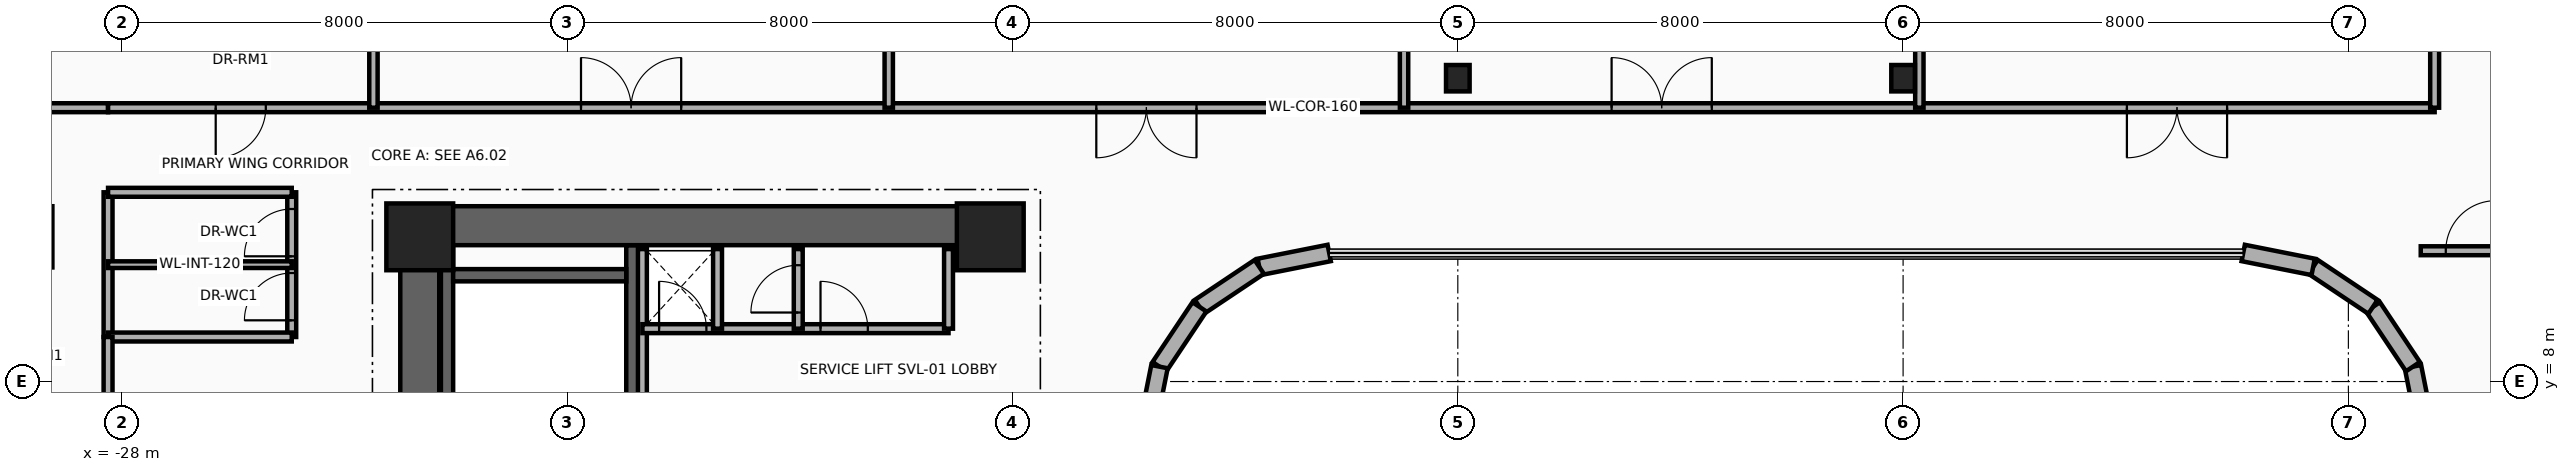
"""IFC4 building model, lengths in metres.
Left out: names, types, materials, properties, quantities, classifications, styles, units other than length and angle.
Written with IfcOpenShell. Run it as: python <this file> out.ifc"""

import sys

from ifc_helpers import new_model, si_unit, direction, frame, frame_2d, origin, origin_2d, place, context, subcontext, project, spatial, rectangle, i_section, extrude, source, transform, mapped, element, fill, save


model = new_model("IFC4")
c1 = context("Model", 3, precision=1e-05, world=origin(), true_north=direction((0.0, 1.0)))
c2 = subcontext(c1, "Body", "Model", "MODEL_VIEW")
j1 = project(units=[si_unit("LENGTHUNIT", "METRE"), si_unit("PLANEANGLEUNIT", "RADIAN")], contexts=[c1])
p1 = place(None, origin())
s1 = spatial("IfcSite", under=j1, at=p1, CompositionType="ELEMENT")
p2 = place(p1, origin())
s2 = spatial("IfcBuilding", under=s1, at=p2, CompositionType="ELEMENT")
p3 = place(p2, frame((0.0, 0.0, 135.3)))
s3 = spatial("IfcBuildingStorey", under=s2, at=p3, CompositionType="ELEMENT", Elevation=135.3)
for number, where, z_axis, x_axis in (
    (1, (-22.16, 1.78, 0.0), (0.0, 0.0, 1.0), (0.0, 1.0, 0.0)),
    (2, (-18.83, 1.78, 0.0), (0.0, 0.0, 1.0), (0.0, 1.0, 0.0)),
):
    element("IfcWall", number, at=place(p3, frame(where, z_axis=z_axis, x_axis=x_axis)), inside=s3, PredefinedType="SHEAR", context=c2, shape_type="SweptSolid", body=[
        extrude(rectangle(XDim=8.67, YDim=0.22, at=frame_2d((4.335, 0.0))), origin(), (0.0, 0.0, 1.0), 3.46),
    ])
p4 = place(p3, frame((-22.05, 9.91, 0.0), z_axis=(0.0, 0.0, 1.0), x_axis=(1.0, 0.0, 0.0)))
e3 = element("IfcWall", 3, at=p4, inside=s3, PredefinedType="SHEAR", context=c2, shape_type="SweptSolid", body=[
    extrude(rectangle(XDim=3.11, YDim=0.22, at=frame_2d((1.555, 0.0))), origin(), (0.0, 0.0, 1.0), 3.46),
])
p5 = place(p3, frame((-22.65, -11.15, 0.0), z_axis=(0.0, 0.0, 1.0), x_axis=(0.0, 1.0, 0.0)))
e4 = element("IfcWall", 4, at=p5, inside=s3, PredefinedType="SHEAR", context=c2, shape_type="SweptSolid", body=[
    extrude(rectangle(XDim=22.3, YDim=0.7, at=frame_2d((11.15, 0.0))), origin(), (0.0, 0.0, 1.0), 3.46),
])
p6 = place(p3, frame((-22.65, 10.8, 0.0), z_axis=(0.0, 0.0, 1.0), x_axis=(1.0, 0.0, 0.0)))
e5 = element("IfcWall", 5, at=p6, inside=s3, PredefinedType="SHEAR", context=c2, shape_type="SweptSolid", body=[
    extrude(rectangle(XDim=10.25, YDim=0.7, at=frame_2d((5.125, 0.0))), origin(), (0.0, 0.0, 1.0), 3.46),
])
m1 = source(origin(), c2, "Body", "SweptSolid", [
    extrude(rectangle(XDim=1.2, YDim=1.2, at=origin_2d()), origin(), (0.0, 0.0, 1.0), 3.7),
])
for number, where, z_axis, x_axis in (
    (6, (-22.65, 10.6, 0.0), (0.0, 0.0, 1.0), (1.0, 0.0, 0.0)),
    (7, (-12.4, 10.6, 0.0), (0.0, 0.0, 1.0), (1.0, 0.0, 0.0)),
):
    element("IfcColumn", number, at=place(p3, frame(where, z_axis=z_axis, x_axis=x_axis)), inside=s3, PredefinedType="COLUMN", context=c2, shape_type="MappedRepresentation", body=[
        mapped(m1, transform((0.0, 0.0, 0.0), x_axis=(1.0, 0.0, 0.0), y_axis=(0.0, 1.0, 0.0), z_axis=(0.0, 0.0, 1.0), scale=1.0)),
    ])
m2 = source(origin(), c2, "Body", "SweptSolid", [
    extrude(i_section(OverallWidth=0.424, OverallDepth=0.474, WebThickness=0.048, FlangeThickness=0.077, at=origin_2d()), origin(), (0.0, 0.0, 1.0), 3.7),
])
for number, where, z_axis, x_axis in (
    (8, (-4.0, 13.45, 0.0), (0.0, 0.0, 1.0), (1.0, 0.0, 0.0)),
    (9, (4.0, 13.45, 0.0), (0.0, 0.0, 1.0), (1.0, 0.0, 0.0)),
):
    element("IfcColumn", number, at=place(p3, frame(where, z_axis=z_axis, x_axis=x_axis)), inside=s3, PredefinedType="COLUMN", context=c2, shape_type="MappedRepresentation", body=[
        mapped(m2, transform((0.0, 0.0, 0.0), x_axis=(1.0, 0.0, 0.0), y_axis=(0.0, 1.0, 0.0), z_axis=(0.0, 0.0, 1.0), scale=1.0)),
    ])
p7 = place(p3, frame((13.41, 7.011, 0.0), z_axis=(0.0, 0.0, 1.0), x_axis=(-0.195090163074, 0.980785312019, 0.0)))
e10 = element("IfcWall", 10, at=p7, inside=s3, PredefinedType="SOLIDWALL", context=c2, shape_type="SweptSolid", body=[
    extrude(rectangle(XDim=1.281, YDim=0.3, at=frame_2d((0.641, 0.0))), origin(), (0.0, 0.0, 1.0), 3.46),
])
for number, where, z_axis, x_axis in (
    (11, (13.16, 8.268, 0.0), (0.0, 0.0, 1.0), (-0.556, 0.831, 0.0)),
    (12, (12.442, 9.342, 0.0), (0.0, 0.0, 1.0), (-0.831, 0.556, 0.0)),
):
    element("IfcWall", number, at=place(p3, frame(where, z_axis=z_axis, x_axis=x_axis)), inside=s3, PredefinedType="SOLIDWALL", context=c2, shape_type="SweptSolid", body=[
        extrude(rectangle(XDim=1.292, YDim=0.3, at=frame_2d((0.646, 0.0))), origin(), (0.0, 0.0, 1.0), 3.46),
    ])
for number, where, z_axis, x_axis in (
    (13, (11.367, 10.06, 0.0), (0.0, 0.0, 1.0), (-0.981, 0.195, 0.0)),
    (14, (-6.311, 10.31, 0.0), (0.0, 0.0, 1.0), (-0.981, -0.195, 0.0)),
):
    element("IfcWall", number, at=place(p3, frame(where, z_axis=z_axis, x_axis=x_axis)), inside=s3, PredefinedType="SOLIDWALL", context=c2, shape_type="SweptSolid", body=[
        extrude(rectangle(XDim=1.281, YDim=0.3, at=frame_2d((0.641, 0.0))), origin(), (0.0, 0.0, 1.0), 3.46),
    ])
p8 = place(p3, frame((-7.567, 10.06, 0.0), z_axis=(0.0, 0.0, 1.0), x_axis=(-0.831497739511, -0.555528135371, 0.0)))
e15 = element("IfcWall", 15, at=p8, inside=s3, PredefinedType="SOLIDWALL", context=c2, shape_type="SweptSolid", body=[
    extrude(rectangle(XDim=1.292, YDim=0.3, at=frame_2d((0.646, 0.0))), origin(), (0.0, 0.0, 1.0), 3.46),
])
p9 = place(p3, frame((-8.642, 9.342, 0.0), z_axis=(0.0, 0.0, 1.0), x_axis=(-0.555615398575, -0.831439431869, 0.0)))
e16 = element("IfcWall", 16, at=p9, inside=s3, PredefinedType="SOLIDWALL", context=c2, shape_type="SweptSolid", body=[
    extrude(rectangle(XDim=1.292, YDim=0.3, at=frame_2d((0.646, 0.0))), origin(), (0.0, 0.0, 1.0), 3.46),
])
p10 = place(p3, frame((-9.36, 8.268, 0.0), z_axis=(0.0, 0.0, 1.0), x_axis=(-0.195090163074, -0.980785312019, 0.0)))
e17 = element("IfcWall", 17, at=p10, inside=s3, PredefinedType="SOLIDWALL", context=c2, shape_type="SweptSolid", body=[
    extrude(rectangle(XDim=1.281, YDim=0.3, at=frame_2d((0.641, 0.0))), origin(), (0.0, 0.0, 1.0), 3.46),
])
p11 = place(p3, frame((-18.65, 7.45, 0.0), z_axis=(0.0, 0.0, 1.0), x_axis=(0.0, 1.0, 0.0)))
e18 = element("IfcWall", 18, at=p11, inside=s3, PredefinedType="PARTITIONING", context=c2, shape_type="SweptSolid", body=[
    extrude(rectangle(XDim=2.93, YDim=0.16, at=frame_2d((1.465, 0.0))), origin(), (0.0, 0.0, 1.0), 3.46),
])
p12 = place(p3, frame((-18.65, 8.95, 0.0), z_axis=(0.0, 0.0, 1.0), x_axis=(1.0, 0.0, 0.0)))
e19 = element("IfcWall", 19, at=p12, inside=s3, PredefinedType="PARTITIONING", context=c2, shape_type="SweptSolid", body=[
    extrude(rectangle(XDim=5.5, YDim=0.16, at=frame_2d((2.75, 0.0))), origin(), (0.0, 0.0, 1.0), 3.46),
])
p13 = place(p12, frame((0.3, 0.0, 0.0)))
e20 = element("IfcOpeningElement", 20, at=p13, cuts=e19, PredefinedType="OPENING", context=c2, shape_type="SweptSolid", body=[
    extrude(rectangle(XDim=0.85, YDim=2.05, at=frame_2d((0.425, 1.025))), frame((0.0, 0.095, 0.0), z_axis=(0.0, -1.0, 0.0), x_axis=(1.0, 0.0, 0.0)), (0.0, 0.0, 1.0), 0.19),
])
p14 = place(p12, frame((3.2, 0.0, 0.0)))
e21 = element("IfcOpeningElement", 21, at=p14, cuts=e19, PredefinedType="OPENING", context=c2, shape_type="SweptSolid", body=[
    extrude(rectangle(XDim=0.85, YDim=2.05, at=frame_2d((0.425, 1.025))), frame((0.0, 0.095, 0.0), z_axis=(0.0, -1.0, 0.0), x_axis=(1.0, 0.0, 0.0)), (0.0, 0.0, 1.0), 0.19),
])
for number, where, z_axis, x_axis in (
    (22, (-13.15, 8.95, 0.0), (0.0, 0.0, 1.0), (0.0, 1.0, 0.0)),
    (23, (-17.3, 8.95, 0.0), (0.0, 0.0, 1.0), (0.0, 1.0, 0.0)),
):
    element("IfcWall", number, at=place(p3, frame(where, z_axis=z_axis, x_axis=x_axis)), inside=s3, PredefinedType="PARTITIONING", context=c2, shape_type="SweptSolid", body=[
        extrude(rectangle(XDim=1.43, YDim=0.16, at=frame_2d((0.715, 0.0))), origin(), (0.0, 0.0, 1.0), 3.46),
    ])
p15 = place(p3, frame((-15.85, 8.95, 0.0), z_axis=(0.0, 0.0, 1.0), x_axis=(0.0, 1.0, 0.0)))
e24 = element("IfcWall", 24, at=p15, inside=s3, PredefinedType="PARTITIONING", context=c2, shape_type="SweptSolid", body=[
    extrude(rectangle(XDim=1.43, YDim=0.16, at=frame_2d((0.715, 0.0))), origin(), (0.0, 0.0, 1.0), 3.46),
])
p16 = place(p15, frame((0.29, 0.0, 0.0)))
e25 = element("IfcOpeningElement", 25, at=p16, cuts=e24, PredefinedType="OPENING", context=c2, shape_type="SweptSolid", body=[
    extrude(rectangle(XDim=0.85, YDim=2.05, at=frame_2d((0.425, 1.025))), frame((0.0, 0.095, 0.0), z_axis=(0.0, -1.0, 0.0), x_axis=(1.0, 0.0, 0.0)), (0.0, 0.0, 1.0), 0.19),
])
p17 = place(p3, frame((-28.25, 8.8, 0.0), z_axis=(0.0, 0.0, 1.0), x_axis=(0.0, 1.0, 0.0)))
e26 = element("IfcWall", 26, at=p17, inside=s3, PredefinedType="PARTITIONING", context=c2, shape_type="SweptSolid", body=[
    extrude(rectangle(XDim=2.6, YDim=0.16, at=frame_2d((1.3, 0.0))), origin(), (0.0, 0.0, 1.0), 2.666),
])
p18 = place(p3, frame((-24.95, 8.8, 0.0), z_axis=(0.0, 0.0, 1.0), x_axis=(0.0, 1.0, 0.0)))
e27 = element("IfcWall", 27, at=p18, inside=s3, PredefinedType="PARTITIONING", context=c2, shape_type="SweptSolid", body=[
    extrude(rectangle(XDim=2.6, YDim=0.16, at=frame_2d((1.3, 0.0))), origin(), (0.0, 0.0, 1.0), 2.666),
])
p19 = place(p18, frame((0.3, 0.0, 0.0)))
e28 = element("IfcOpeningElement", 28, at=p19, cuts=e27, PredefinedType="OPENING", context=c2, shape_type="SweptSolid", body=[
    extrude(rectangle(XDim=0.85, YDim=2.1, at=frame_2d((0.425, 1.05))), frame((0.0, 0.095, 0.0), z_axis=(0.0, -1.0, 0.0), x_axis=(1.0, 0.0, 0.0)), (0.0, 0.0, 1.0), 0.19),
])
p20 = place(p18, frame((1.45, 0.0, 0.0)))
e29 = element("IfcOpeningElement", 29, at=p20, cuts=e27, PredefinedType="OPENING", context=c2, shape_type="SweptSolid", body=[
    extrude(rectangle(XDim=0.85, YDim=2.1, at=frame_2d((0.425, 1.05))), frame((0.0, 0.095, 0.0), z_axis=(0.0, -1.0, 0.0), x_axis=(1.0, 0.0, 0.0)), (0.0, 0.0, 1.0), 0.19),
])
for number, where, z_axis, x_axis in (
    (30, (-28.25, 8.8, 0.0), (0.0, 0.0, 1.0), (1.0, 0.0, 0.0)),
    (31, (-28.25, 11.4, 0.0), (0.0, 0.0, 1.0), (1.0, 0.0, 0.0)),
):
    element("IfcWall", number, at=place(p3, frame(where, z_axis=z_axis, x_axis=x_axis)), inside=s3, PredefinedType="PARTITIONING", context=c2, shape_type="SweptSolid", body=[
        extrude(rectangle(XDim=3.3, YDim=0.16, at=frame_2d((1.65, 0.0))), origin(), (0.0, 0.0, 1.0), 3.46),
    ])
p21 = place(p3, frame((-28.25, 10.1, 0.0), z_axis=(0.0, 0.0, 1.0), x_axis=(1.0, 0.0, 0.0)))
e32 = element("IfcWall", 32, at=p21, inside=s3, PredefinedType="PARTITIONING", context=c2, shape_type="SweptSolid", body=[
    extrude(rectangle(XDim=3.3, YDim=0.12, at=frame_2d((1.65, 0.0))), origin(), (0.0, 0.0, 1.0), 3.46),
])
p22 = place(p3, frame((-28.25, 7.6, 0.0), z_axis=(0.0, 0.0, 1.0), x_axis=(0.0, 1.0, 0.0)))
e33 = element("IfcWall", 33, at=p22, inside=s3, PredefinedType="PARTITIONING", context=c2, shape_type="SweptSolid", body=[
    extrude(rectangle(XDim=1.2, YDim=0.16, at=frame_2d((0.6, 0.0))), origin(), (0.0, 0.0, 1.0), 2.988),
])
p23 = place(p3, frame((-30.89, 12.92, 0.0), z_axis=(0.0, 0.0, 1.0), x_axis=(1.0, 0.0, 0.0)))
e34 = element("IfcWall", 34, at=p23, inside=s3, PredefinedType="PARTITIONING", context=c2, shape_type="SweptSolid", body=[
    extrude(rectangle(XDim=2.64, YDim=0.16, at=frame_2d((1.32, 0.0))), origin(), (0.0, 0.0, 1.0), 2.896),
])
p24 = place(p3, frame((-28.25, 12.92, 0.0), z_axis=(0.0, 0.0, 1.0), x_axis=(1.0, 0.0, 0.0)))
e35 = element("IfcWall", 35, at=p24, inside=s3, PredefinedType="PARTITIONING", context=c2, shape_type="SweptSolid", body=[
    extrude(rectangle(XDim=41.8, YDim=0.16, at=frame_2d((20.9, 0.0))), origin(), (0.0, 0.0, 1.0), 2.666),
])
p25 = place(p24, frame((1.934, 0.0, 0.0)))
e36 = element("IfcOpeningElement", 36, at=p25, cuts=e35, PredefinedType="OPENING", context=c2, shape_type="SweptSolid", body=[
    extrude(rectangle(XDim=0.9, YDim=2.1, at=frame_2d((0.45, 1.05))), frame((0.0, 0.095, 0.0), z_axis=(0.0, -1.0, 0.0), x_axis=(1.0, 0.0, 0.0)), (0.0, 0.0, 1.0), 0.19),
])
p26 = place(p24, frame((8.497, 0.0, 0.0)))
e37 = element("IfcOpeningElement", 37, at=p26, cuts=e35, PredefinedType="OPENING", context=c2, shape_type="SweptSolid", body=[
    extrude(rectangle(XDim=1.8, YDim=2.15, at=frame_2d((0.9, 1.075))), frame((0.0, 0.095, 0.0), z_axis=(0.0, -1.0, 0.0), x_axis=(1.0, 0.0, 0.0)), (0.0, 0.0, 1.0), 0.19),
])
p27 = place(p24, frame((17.755, 0.0, 0.0)))
e38 = element("IfcOpeningElement", 38, at=p27, cuts=e35, PredefinedType="OPENING", context=c2, shape_type="SweptSolid", body=[
    extrude(rectangle(XDim=1.8, YDim=2.15, at=frame_2d((0.9, 1.075))), frame((0.0, 0.095, 0.0), z_axis=(0.0, -1.0, 0.0), x_axis=(1.0, 0.0, 0.0)), (0.0, 0.0, 1.0), 0.19),
])
p28 = place(p24, frame((27.013, 0.0, 0.0)))
e39 = element("IfcOpeningElement", 39, at=p28, cuts=e35, PredefinedType="OPENING", context=c2, shape_type="SweptSolid", body=[
    extrude(rectangle(XDim=1.8, YDim=2.15, at=frame_2d((0.9, 1.075))), frame((0.0, 0.095, 0.0), z_axis=(0.0, -1.0, 0.0), x_axis=(1.0, 0.0, 0.0)), (0.0, 0.0, 1.0), 0.19),
])
p29 = place(p24, frame((36.271, 0.0, 0.0)))
e40 = element("IfcOpeningElement", 40, at=p29, cuts=e35, PredefinedType="OPENING", context=c2, shape_type="SweptSolid", body=[
    extrude(rectangle(XDim=1.8, YDim=2.15, at=frame_2d((0.9, 1.075))), frame((0.0, 0.095, 0.0), z_axis=(0.0, -1.0, 0.0), x_axis=(1.0, 0.0, 0.0)), (0.0, 0.0, 1.0), 0.19),
])
p30 = place(p3, frame((13.55, 12.92, 0.0), z_axis=(0.0, 0.0, 1.0), x_axis=(0.0, 1.0, 0.0)))
e41 = element("IfcWall", 41, at=p30, inside=s3, PredefinedType="PARTITIONING", context=c2, shape_type="SweptSolid", body=[
    extrude(rectangle(XDim=5.857, YDim=0.16, at=frame_2d((2.928, 0.0))), origin(), (0.0, 0.0, 1.0), 2.666),
])
p31 = place(p3, frame((-23.482, 12.92, 0.0), z_axis=(0.0, 0.0, 1.0), x_axis=(0.0, 1.0, 0.0)))
e42 = element("IfcWall", 42, at=p31, inside=s3, PredefinedType="PARTITIONING", context=c2, shape_type="SweptSolid", body=[
    extrude(rectangle(XDim=6.409, YDim=0.15, at=frame_2d((3.204, 0.0))), origin(), (0.0, 0.0, 1.0), 2.666),
])
for number, where, z_axis, x_axis in (
    (43, (-14.224, 12.92, 0.0), (0.0, 0.0, 1.0), (0.0, 1.0, 0.0)),
    (44, (-4.966, 12.92, 0.0), (0.0, 0.0, 1.0), (0.0, 1.0, 0.0)),
):
    element("IfcWall", number, at=place(p3, frame(where, z_axis=z_axis, x_axis=x_axis)), inside=s3, PredefinedType="PARTITIONING", context=c2, shape_type="SweptSolid", body=[
        extrude(rectangle(XDim=7.196, YDim=0.15, at=frame_2d((3.598, 0.0))), origin(), (0.0, 0.0, 1.0), 2.666),
    ])
p32 = place(p3, frame((4.292, 12.92, 0.0), z_axis=(0.0, 0.0, 1.0), x_axis=(0.0, 1.0, 0.0)))
e45 = element("IfcWall", 45, at=p32, inside=s3, PredefinedType="PARTITIONING", context=c2, shape_type="SweptSolid", body=[
    extrude(rectangle(XDim=6.775, YDim=0.15, at=frame_2d((3.387, 0.0))), origin(), (0.0, 0.0, 1.0), 2.666),
])
p33 = place(p3, frame((13.3, 10.35, 0.0), z_axis=(0.0, 0.0, 1.0), x_axis=(1.0, 0.0, 0.0)))
e46 = element("IfcWall", 46, at=p33, inside=s3, PredefinedType="PARTITIONING", context=c2, shape_type="SweptSolid", body=[
    extrude(rectangle(XDim=2.1, YDim=0.16, at=frame_2d((1.05, 0.0))), origin(), (0.0, 0.0, 1.0), 2.666),
])
p34 = place(p33, frame((0.45, 0.0, 0.0)))
e47 = element("IfcOpeningElement", 47, at=p34, cuts=e46, PredefinedType="OPENING", context=c2, shape_type="SweptSolid", body=[
    extrude(rectangle(XDim=0.9, YDim=2.1, at=frame_2d((0.45, 1.05))), frame((0.0, 0.095, 0.0), z_axis=(0.0, -1.0, 0.0), x_axis=(1.0, 0.0, 0.0)), (0.0, 0.0, 1.0), 0.19),
])
p35 = place(p13, origin())
e48 = element("IfcDoor", 48, at=p35, inside=s3, OperationType="SINGLE_SWING_LEFT", PredefinedType="DOOR", context=c2, shape_type="SweptSolid", body=[
    extrude(rectangle(XDim=0.85, YDim=2.05, at=frame_2d((0.425, 1.025))), frame((0.0, 0.025, 0.0), z_axis=(0.0, -1.0, 0.0), x_axis=(1.0, 0.0, 0.0)), (0.0, 0.0, 1.0), 0.05),
])
fill(e20, e48)
p36 = place(p14, origin())
e49 = element("IfcDoor", 49, at=p36, inside=s3, OperationType="SINGLE_SWING_RIGHT", PredefinedType="DOOR", context=c2, shape_type="SweptSolid", body=[
    extrude(rectangle(XDim=0.85, YDim=2.05, at=frame_2d((0.425, 1.025))), frame((0.0, 0.025, 0.0), z_axis=(0.0, -1.0, 0.0), x_axis=(1.0, 0.0, 0.0)), (0.0, 0.0, 1.0), 0.05),
])
fill(e21, e49)
p37 = place(p16, origin())
e50 = element("IfcDoor", 50, at=p37, inside=s3, OperationType="SINGLE_SWING_LEFT", PredefinedType="DOOR", context=c2, shape_type="SweptSolid", body=[
    extrude(rectangle(XDim=0.85, YDim=2.05, at=frame_2d((0.425, 1.025))), frame((0.0, 0.025, 0.0), z_axis=(0.0, -1.0, 0.0), x_axis=(1.0, 0.0, 0.0)), (0.0, 0.0, 1.0), 0.05),
])
fill(e25, e50)
p38 = place(p19, origin())
e51 = element("IfcDoor", 51, at=p38, inside=s3, OperationType="SINGLE_SWING_LEFT", PredefinedType="DOOR", context=c2, shape_type="SweptSolid", body=[
    extrude(rectangle(XDim=0.85, YDim=2.1, at=frame_2d((0.425, 1.05))), frame((0.0, 0.025, 0.0), z_axis=(0.0, -1.0, 0.0), x_axis=(1.0, 0.0, 0.0)), (0.0, 0.0, 1.0), 0.05),
])
fill(e28, e51)
p39 = place(p20, origin())
e52 = element("IfcDoor", 52, at=p39, inside=s3, OperationType="SINGLE_SWING_RIGHT", PredefinedType="DOOR", context=c2, shape_type="SweptSolid", body=[
    extrude(rectangle(XDim=0.85, YDim=2.1, at=frame_2d((0.425, 1.05))), frame((0.0, 0.025, 0.0), z_axis=(0.0, -1.0, 0.0), x_axis=(1.0, 0.0, 0.0)), (0.0, 0.0, 1.0), 0.05),
])
fill(e29, e52)
p40 = place(p25, frame((0.9, 0.0, 0.0), z_axis=(0.0, 0.0, 1.0), x_axis=(-1.0, 0.0, 0.0)))
e53 = element("IfcDoor", 53, at=p40, inside=s3, OperationType="SINGLE_SWING_LEFT", PredefinedType="DOOR", context=c2, shape_type="SweptSolid", body=[
    extrude(rectangle(XDim=0.9, YDim=2.1, at=frame_2d((0.45, 1.05))), frame((0.0, 0.025, 0.0), z_axis=(0.0, -1.0, 0.0), x_axis=(1.0, 0.0, 0.0)), (0.0, 0.0, 1.0), 0.05),
])
fill(e36, e53)
p41 = place(p26, origin())
e54 = element("IfcDoor", 54, at=p41, inside=s3, OperationType="DOUBLE_DOOR_SINGLE_SWING", PredefinedType="DOOR", context=c2, shape_type="SweptSolid", body=[
    extrude(rectangle(XDim=1.8, YDim=2.15, at=frame_2d((0.9, 1.075))), frame((0.0, 0.025, 0.0), z_axis=(0.0, -1.0, 0.0), x_axis=(1.0, 0.0, 0.0)), (0.0, 0.0, 1.0), 0.05),
])
fill(e37, e54)
p42 = place(p27, frame((1.8, 0.0, 0.0), z_axis=(0.0, 0.0, 1.0), x_axis=(-1.0, 0.0, 0.0)))
e55 = element("IfcDoor", 55, at=p42, inside=s3, OperationType="DOUBLE_DOOR_SINGLE_SWING", PredefinedType="DOOR", context=c2, shape_type="SweptSolid", body=[
    extrude(rectangle(XDim=1.8, YDim=2.15, at=frame_2d((0.9, 1.075))), frame((0.0, 0.025, 0.0), z_axis=(0.0, -1.0, 0.0), x_axis=(1.0, 0.0, 0.0)), (0.0, 0.0, 1.0), 0.05),
])
fill(e38, e55)
p43 = place(p28, origin())
e56 = element("IfcDoor", 56, at=p43, inside=s3, OperationType="DOUBLE_DOOR_SINGLE_SWING", PredefinedType="DOOR", context=c2, shape_type="SweptSolid", body=[
    extrude(rectangle(XDim=1.8, YDim=2.15, at=frame_2d((0.9, 1.075))), frame((0.0, 0.025, 0.0), z_axis=(0.0, -1.0, 0.0), x_axis=(1.0, 0.0, 0.0)), (0.0, 0.0, 1.0), 0.05),
])
fill(e39, e56)
p44 = place(p29, frame((1.8, 0.0, 0.0), z_axis=(0.0, 0.0, 1.0), x_axis=(-1.0, 0.0, 0.0)))
e57 = element("IfcDoor", 57, at=p44, inside=s3, OperationType="DOUBLE_DOOR_SINGLE_SWING", PredefinedType="DOOR", context=c2, shape_type="SweptSolid", body=[
    extrude(rectangle(XDim=1.8, YDim=2.15, at=frame_2d((0.9, 1.075))), frame((0.0, 0.025, 0.0), z_axis=(0.0, -1.0, 0.0), x_axis=(1.0, 0.0, 0.0)), (0.0, 0.0, 1.0), 0.05),
])
fill(e40, e57)
p45 = place(p34, origin())
e58 = element("IfcDoor", 58, at=p45, inside=s3, OperationType="SINGLE_SWING_LEFT", PredefinedType="DOOR", context=c2, shape_type="SweptSolid", body=[
    extrude(rectangle(XDim=0.9, YDim=2.1, at=frame_2d((0.45, 1.05))), frame((0.0, 0.025, 0.0), z_axis=(0.0, -1.0, 0.0), x_axis=(1.0, 0.0, 0.0)), (0.0, 0.0, 1.0), 0.05),
])
fill(e47, e58)
save(model, sys.argv[1])
